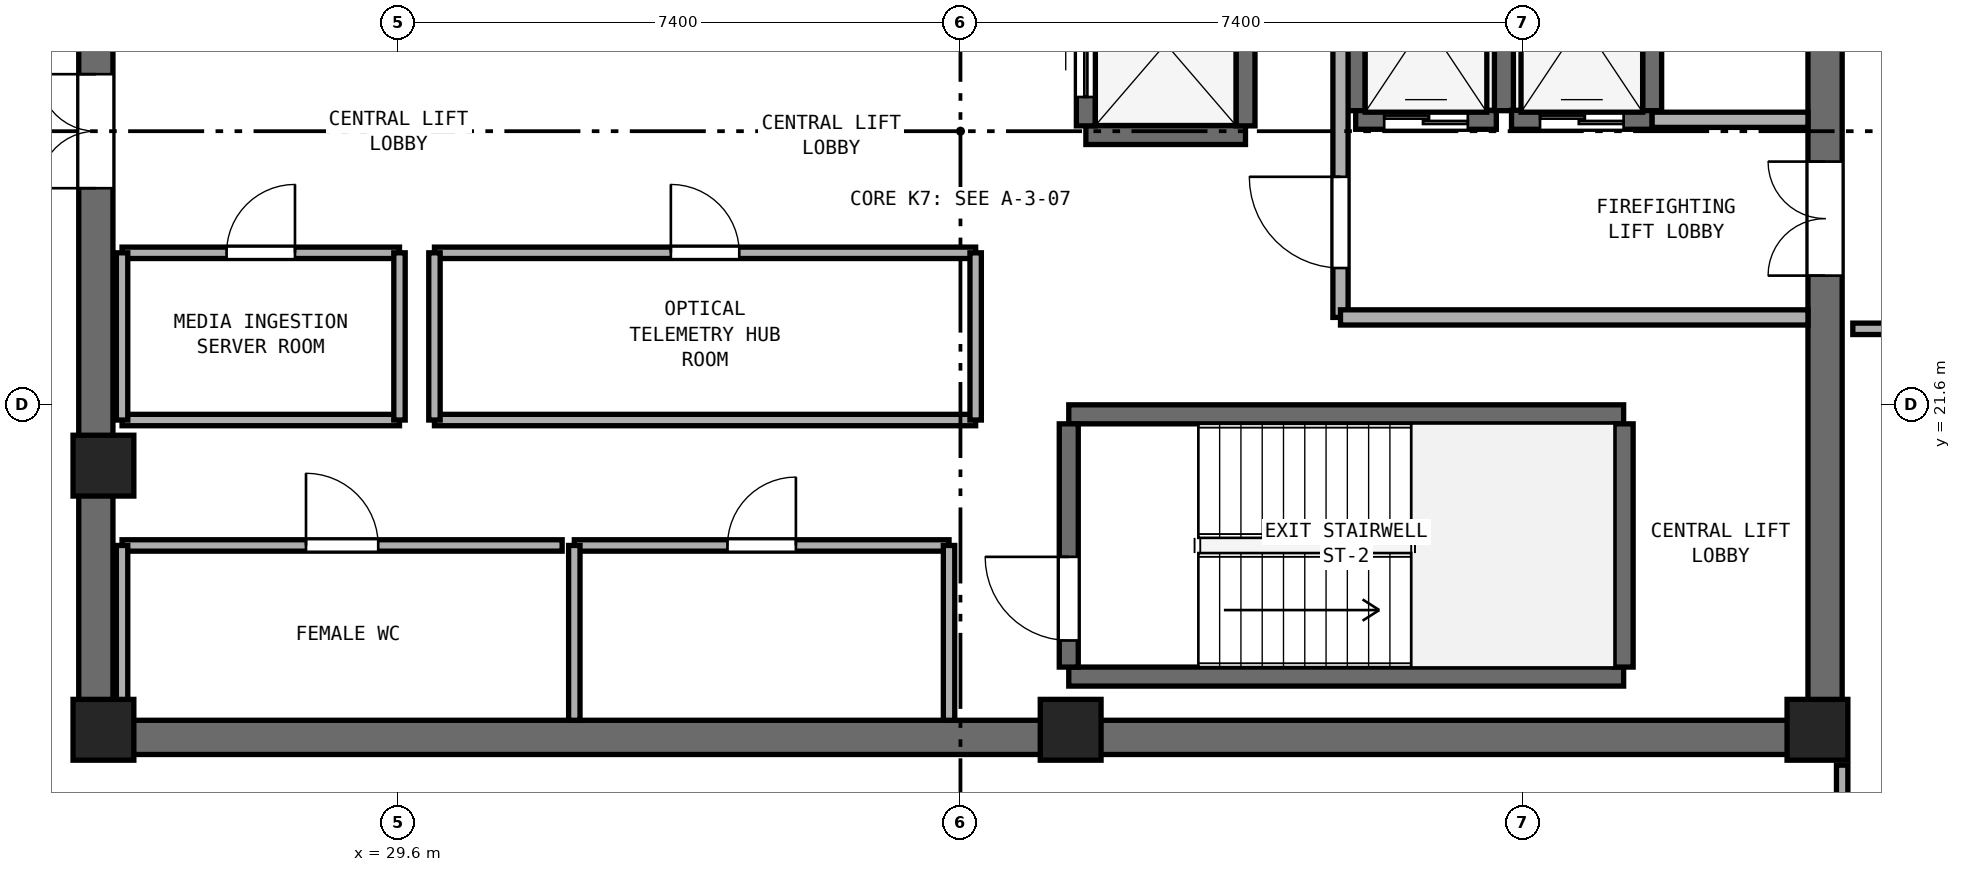
"""IFC4 building model, lengths in metres.
Left out: names, types, materials, properties, quantities, classifications, styles, units other than length and angle.
Written with IfcOpenShell. Run it as: python <this file> out.ifc"""

import sys

from ifc_helpers import new_model, si_unit, direction, frame, frame_2d, origin, origin_2d, place, context, subcontext, project, spatial, rectangle, extrude, element, fill, save


model = new_model("IFC4")
c1 = context("Model", 3, precision=1e-05, world=origin(), true_north=direction((0.0, 1.0)))
c2 = subcontext(c1, "Body", "Model", "MODEL_VIEW")
j1 = project(units=[si_unit("LENGTHUNIT", "METRE"), si_unit("PLANEANGLEUNIT", "RADIAN")], contexts=[c1])
p1 = place(None, origin())
s1 = spatial("IfcSite", under=j1, at=p1, CompositionType="ELEMENT")
p2 = place(p1, origin())
s2 = spatial("IfcBuilding", under=s1, at=p2, CompositionType="ELEMENT")
p3 = place(p2, frame((0.0, 0.0, 297.2)))
s3 = spatial("IfcBuildingStorey", under=s2, at=p3, CompositionType="ELEMENT", Elevation=297.2)
p4 = place(p3, frame((25.4, 17.225, 0.0), z_axis=(0.0, 0.0, 1.0), x_axis=(1.0, 0.0, 0.0)))
e1 = element("IfcWall", 1, at=p4, inside=s3, PredefinedType="SHEAR", context=c2, shape_type="SweptSolid", body=[
    extrude(rectangle(XDim=23.2, YDim=0.45, at=frame_2d((11.6, 0.0))), origin(), (0.0, 0.0, 1.0), 3.54),
])
p5 = place(p3, frame((25.625, 17.45, 0.0), z_axis=(0.0, 0.0, 1.0), x_axis=(0.0, 1.0, 0.0)))
e2 = element("IfcWall", 2, at=p5, inside=s3, PredefinedType="SHEAR", context=c2, shape_type="SweptSolid", body=[
    extrude(rectangle(XDim=15.5, YDim=0.45, at=frame_2d((7.75, 0.0))), origin(), (0.0, 0.0, 1.0), 3.54),
])
p6 = place(p5, frame((7.0, 0.0, 0.0)))
e3 = element("IfcOpeningElement", 3, at=p6, cuts=e2, PredefinedType="OPENING", context=c2, shape_type="SweptSolid", body=[
    extrude(rectangle(XDim=1.5, YDim=2.15, at=frame_2d((0.75, 1.075))), frame((0.0, 0.235, 0.0), z_axis=(0.0, -1.0, 0.0), x_axis=(1.0, 0.0, 0.0)), (0.0, 0.0, 1.0), 0.47),
])
p7 = place(p3, frame((48.375, 17.45, 0.0), z_axis=(0.0, 0.0, 1.0), x_axis=(0.0, 1.0, 0.0)))
e4 = element("IfcWall", 4, at=p7, inside=s3, PredefinedType="SHEAR", context=c2, shape_type="SweptSolid", body=[
    extrude(rectangle(XDim=15.5, YDim=0.45, at=frame_2d((7.75, 0.0))), origin(), (0.0, 0.0, 1.0), 3.54),
])
p8 = place(p7, frame((5.85, 0.0, 0.0)))
e5 = element("IfcOpeningElement", 5, at=p8, cuts=e4, PredefinedType="OPENING", context=c2, shape_type="SweptSolid", body=[
    extrude(rectangle(XDim=1.5, YDim=2.15, at=frame_2d((0.75, 1.075))), frame((0.0, 0.235, 0.0), z_axis=(0.0, -1.0, 0.0), x_axis=(1.0, 0.0, 0.0)), (0.0, 0.0, 1.0), 0.47),
])
for number, where, z_axis, x_axis in (
    (6, (25.725, 17.325, 0.0), (0.0, 0.0, 1.0), (1.0, 0.0, 0.0)),
    (7, (38.45, 17.325, 0.0), (0.0, 0.0, 1.0), (1.0, 0.0, 0.0)),
    (8, (48.275, 17.325, 0.0), (0.0, 0.0, 1.0), (1.0, 0.0, 0.0)),
    (9, (25.725, 20.8, 0.0), (0.0, 0.0, 1.0), (1.0, 0.0, 0.0)),
):
    element("IfcColumn", number, at=place(p3, frame(where, z_axis=z_axis, x_axis=x_axis)), inside=s3, PredefinedType="PILASTER", context=c2, shape_type="SweptSolid", body=[
        extrude(rectangle(XDim=0.8, YDim=0.8, at=origin_2d()), origin(), (0.0, 0.0, 1.0), 3.8),
    ])
for number, where, z_axis, x_axis in (
    (10, (38.425, 18.025, 0.0), (0.0, 0.0, 1.0), (1.0, 0.0, 0.0)),
    (11, (38.425, 21.475, 0.0), (0.0, 0.0, 1.0), (1.0, 0.0, 0.0)),
):
    element("IfcWall", number, at=place(p3, frame(where, z_axis=z_axis, x_axis=x_axis)), inside=s3, PredefinedType="SHEAR", context=c2, shape_type="SweptSolid", body=[
        extrude(rectangle(XDim=7.3, YDim=0.25, at=frame_2d((3.65, 0.0))), origin(), (0.0, 0.0, 1.0), 3.54),
    ])
p9 = place(p3, frame((38.425, 18.15, 0.0), z_axis=(0.0, 0.0, 1.0), x_axis=(0.0, 1.0, 0.0)))
e12 = element("IfcWall", 12, at=p9, inside=s3, PredefinedType="SHEAR", context=c2, shape_type="SweptSolid", body=[
    extrude(rectangle(XDim=3.2, YDim=0.25, at=frame_2d((1.6, 0.0))), origin(), (0.0, 0.0, 1.0), 3.54),
])
p10 = place(p9, frame((0.35, 0.0, 0.0)))
e13 = element("IfcOpeningElement", 13, at=p10, cuts=e12, PredefinedType="OPENING", context=c2, shape_type="SweptSolid", body=[
    extrude(rectangle(XDim=1.1, YDim=2.15, at=frame_2d((0.55, 1.075))), frame((0.0, 0.135, 0.0), z_axis=(0.0, -1.0, 0.0), x_axis=(1.0, 0.0, 0.0)), (0.0, 0.0, 1.0), 0.27),
])
p11 = place(p3, frame((45.725, 18.15, 0.0), z_axis=(0.0, 0.0, 1.0), x_axis=(0.0, 1.0, 0.0)))
e14 = element("IfcWall", 14, at=p11, inside=s3, PredefinedType="SHEAR", context=c2, shape_type="SweptSolid", body=[
    extrude(rectangle(XDim=3.2, YDim=0.25, at=frame_2d((1.6, 0.0))), origin(), (0.0, 0.0, 1.0), 3.54),
])
p12 = place(p3, frame((42.2, 25.35, 0.0), z_axis=(0.0, 0.0, 1.0), x_axis=(1.0, 0.0, 0.0)))
e15 = element("IfcWall", 15, at=p12, inside=s3, PredefinedType="SHEAR", context=c2, shape_type="SweptSolid", body=[
    extrude(rectangle(XDim=1.85, YDim=0.25, at=frame_2d((0.925, 0.0))), origin(), (0.0, 0.0, 1.0), 3.54),
])
p13 = place(p12, frame((0.375, 0.0, 0.0)))
e16 = element("IfcOpeningElement", 16, at=p13, cuts=e15, PredefinedType="OPENING", context=c2, shape_type="SweptSolid", body=[
    extrude(rectangle(XDim=1.1, YDim=2.15, at=frame_2d((0.55, 1.075))), frame((0.0, 0.135, 0.0), z_axis=(0.0, -1.0, 0.0), x_axis=(1.0, 0.0, 0.0)), (0.0, 0.0, 1.0), 0.27),
])
for number, where, z_axis, x_axis in (
    (17, (42.2, 25.47, 0.0), (0.0, 0.0, 1.0), (0.0, 1.0, 0.0)),
    (18, (44.15, 25.47, 0.0), (0.0, 0.0, 1.0), (0.0, 1.0, 0.0)),
):
    element("IfcWall", number, at=place(p3, frame(where, z_axis=z_axis, x_axis=x_axis)), inside=s3, PredefinedType="SHEAR", context=c2, shape_type="SweptSolid", body=[
        extrude(rectangle(XDim=2.36, YDim=0.25, at=frame_2d((1.18, 0.0))), origin(), (0.0, 0.0, 1.0), 3.54),
    ])
p14 = place(p3, frame((44.25, 25.35, 0.0), z_axis=(0.0, 0.0, 1.0), x_axis=(1.0, 0.0, 0.0)))
e19 = element("IfcWall", 19, at=p14, inside=s3, PredefinedType="SHEAR", context=c2, shape_type="SweptSolid", body=[
    extrude(rectangle(XDim=1.85, YDim=0.25, at=frame_2d((0.925, 0.0))), origin(), (0.0, 0.0, 1.0), 3.54),
])
p15 = place(p14, frame((0.375, 0.0, 0.0)))
e20 = element("IfcOpeningElement", 20, at=p15, cuts=e19, PredefinedType="OPENING", context=c2, shape_type="SweptSolid", body=[
    extrude(rectangle(XDim=1.1, YDim=2.15, at=frame_2d((0.55, 1.075))), frame((0.0, 0.135, 0.0), z_axis=(0.0, -1.0, 0.0), x_axis=(1.0, 0.0, 0.0)), (0.0, 0.0, 1.0), 0.27),
])
p16 = place(p3, frame((46.1, 25.47, 0.0), z_axis=(0.0, 0.0, 1.0), x_axis=(0.0, 1.0, 0.0)))
e21 = element("IfcWall", 21, at=p16, inside=s3, PredefinedType="SHEAR", context=c2, shape_type="SweptSolid", body=[
    extrude(rectangle(XDim=2.36, YDim=0.25, at=frame_2d((1.18, 0.0))), origin(), (0.0, 0.0, 1.0), 3.54),
])
p17 = place(p3, frame((38.65, 25.15, 0.0), z_axis=(0.0, 0.0, 1.0), x_axis=(1.0, 0.0, 0.0)))
e22 = element("IfcWall", 22, at=p17, inside=s3, PredefinedType="SHEAR", context=c2, shape_type="SweptSolid", body=[
    extrude(rectangle(XDim=2.1, YDim=0.25, at=frame_2d((1.05, 0.0))), origin(), (0.0, 0.0, 1.0), 3.54),
])
p18 = place(p3, frame((38.65, 25.27, 0.0), z_axis=(0.0, 0.0, 1.0), x_axis=(0.0, 1.0, 0.0)))
e23 = element("IfcWall", 23, at=p18, inside=s3, PredefinedType="SHEAR", context=c2, shape_type="SweptSolid", body=[
    extrude(rectangle(XDim=2.16, YDim=0.25, at=frame_2d((1.08, 0.0))), origin(), (0.0, 0.0, 1.0), 3.54),
])
p19 = place(p18, frame((0.38, 0.0, 0.0)))
e24 = element("IfcOpeningElement", 24, at=p19, cuts=e23, PredefinedType="OPENING", context=c2, shape_type="SweptSolid", body=[
    extrude(rectangle(XDim=1.4, YDim=2.2, at=frame_2d((0.7, 1.1))), frame((0.0, 0.135, 0.0), z_axis=(0.0, -1.0, 0.0), x_axis=(1.0, 0.0, 0.0)), (0.0, 0.0, 1.0), 0.27),
])
p20 = place(p3, frame((40.75, 25.27, 0.0), z_axis=(0.0, 0.0, 1.0), x_axis=(0.0, 1.0, 0.0)))
e25 = element("IfcWall", 25, at=p20, inside=s3, PredefinedType="SHEAR", context=c2, shape_type="SweptSolid", body=[
    extrude(rectangle(XDim=2.16, YDim=0.25, at=frame_2d((1.08, 0.0))), origin(), (0.0, 0.0, 1.0), 3.54),
])
p21 = place(p3, frame((42.0, 22.75, 0.0), z_axis=(0.0, 0.0, 1.0), x_axis=(0.0, 1.0, 0.0)))
e26 = element("IfcWall", 26, at=p21, inside=s3, PredefinedType="SOLIDWALL", context=c2, shape_type="SweptSolid", body=[
    extrude(rectangle(XDim=6.05, YDim=0.2, at=frame_2d((3.025, 0.0))), origin(), (0.0, 0.0, 1.0), 3.54),
])
p22 = place(p21, frame((0.65, 0.0, 0.0)))
e27 = element("IfcOpeningElement", 27, at=p22, cuts=e26, PredefinedType="OPENING", context=c2, shape_type="SweptSolid", body=[
    extrude(rectangle(XDim=1.2, YDim=2.15, at=frame_2d((0.6, 1.075))), frame((0.0, 0.11, 0.0), z_axis=(0.0, -1.0, 0.0), x_axis=(1.0, 0.0, 0.0)), (0.0, 0.0, 1.0), 0.22),
])
p23 = place(p3, frame((42.0, 22.75, 0.0), z_axis=(0.0, 0.0, 1.0), x_axis=(1.0, 0.0, 0.0)))
e28 = element("IfcWall", 28, at=p23, inside=s3, PredefinedType="SOLIDWALL", context=c2, shape_type="SweptSolid", body=[
    extrude(rectangle(XDim=6.15, YDim=0.2, at=frame_2d((3.075, 0.0))), origin(), (0.0, 0.0, 1.0), 3.54),
])
p24 = place(p3, frame((46.1, 25.35, 0.0), z_axis=(0.0, 0.0, 1.0), x_axis=(1.0, 0.0, 0.0)))
e29 = element("IfcWall", 29, at=p24, inside=s3, PredefinedType="SOLIDWALL", context=c2, shape_type="SweptSolid", body=[
    extrude(rectangle(XDim=2.05, YDim=0.2, at=frame_2d((1.025, 0.0))), origin(), (0.0, 0.0, 1.0), 3.54),
])
p25 = place(p3, frame((25.97, 19.75, 0.0), z_axis=(0.0, 0.0, 1.0), x_axis=(1.0, 0.0, 0.0)))
e30 = element("IfcWall", 30, at=p25, inside=s3, PredefinedType="PARTITIONING", context=c2, shape_type="SweptSolid", body=[
    extrude(rectangle(XDim=5.79, YDim=0.15, at=frame_2d((2.895, 0.0))), origin(), (0.0, 0.0, 1.0), 3.54),
])
p26 = place(p25, frame((2.42, 0.0, 0.0)))
e31 = element("IfcOpeningElement", 31, at=p26, cuts=e30, PredefinedType="OPENING", context=c2, shape_type="SweptSolid", body=[
    extrude(rectangle(XDim=0.95, YDim=2.1, at=frame_2d((0.475, 1.05))), frame((0.0, 0.085, 0.0), z_axis=(0.0, -1.0, 0.0), x_axis=(1.0, 0.0, 0.0)), (0.0, 0.0, 1.0), 0.17),
])
p27 = place(p3, frame((25.97, 17.45, 0.0), z_axis=(0.0, 0.0, 1.0), x_axis=(0.0, 1.0, 0.0)))
e32 = element("IfcWall", 32, at=p27, inside=s3, PredefinedType="PARTITIONING", context=c2, shape_type="SweptSolid", body=[
    extrude(rectangle(XDim=2.3, YDim=0.15, at=frame_2d((1.15, 0.0))), origin(), (0.0, 0.0, 1.0), 2.64),
])
p28 = place(p3, frame((31.92, 19.75, 0.0), z_axis=(0.0, 0.0, 1.0), x_axis=(1.0, 0.0, 0.0)))
e33 = element("IfcWall", 33, at=p28, inside=s3, PredefinedType="PARTITIONING", context=c2, shape_type="SweptSolid", body=[
    extrude(rectangle(XDim=4.93, YDim=0.15, at=frame_2d((2.465, 0.0))), origin(), (0.0, 0.0, 1.0), 3.54),
])
p29 = place(p28, frame((2.015, 0.0, 0.0)))
e34 = element("IfcOpeningElement", 34, at=p29, cuts=e33, PredefinedType="OPENING", context=c2, shape_type="SweptSolid", body=[
    extrude(rectangle(XDim=0.9, YDim=2.1, at=frame_2d((0.45, 1.05))), frame((0.0, 0.085, 0.0), z_axis=(0.0, -1.0, 0.0), x_axis=(1.0, 0.0, 0.0)), (0.0, 0.0, 1.0), 0.17),
])
for number, where, z_axis, x_axis in (
    (35, (31.92, 17.45, 0.0), (0.0, 0.0, 1.0), (0.0, 1.0, 0.0)),
    (36, (36.85, 17.45, 0.0), (0.0, 0.0, 1.0), (0.0, 1.0, 0.0)),
):
    element("IfcWall", number, at=place(p3, frame(where, z_axis=z_axis, x_axis=x_axis)), inside=s3, PredefinedType="PARTITIONING", context=c2, shape_type="SweptSolid", body=[
        extrude(rectangle(XDim=2.3, YDim=0.15, at=frame_2d((1.15, 0.0))), origin(), (0.0, 0.0, 1.0), 3.54),
    ])
p30 = place(p3, frame((25.97, 21.4, 0.0), z_axis=(0.0, 0.0, 1.0), x_axis=(1.0, 0.0, 0.0)))
e37 = element("IfcWall", 37, at=p30, inside=s3, PredefinedType="PARTITIONING", context=c2, shape_type="SweptSolid", body=[
    extrude(rectangle(XDim=3.65, YDim=0.15, at=frame_2d((1.825, 0.0))), origin(), (0.0, 0.0, 1.0), 3.54),
])
p31 = place(p3, frame((25.97, 23.6, 0.0), z_axis=(0.0, 0.0, 1.0), x_axis=(1.0, 0.0, 0.0)))
e38 = element("IfcWall", 38, at=p31, inside=s3, PredefinedType="PARTITIONING", context=c2, shape_type="SweptSolid", body=[
    extrude(rectangle(XDim=3.65, YDim=0.15, at=frame_2d((1.825, 0.0))), origin(), (0.0, 0.0, 1.0), 3.54),
])
p32 = place(p31, frame((1.375, 0.0, 0.0)))
e39 = element("IfcOpeningElement", 39, at=p32, cuts=e38, PredefinedType="OPENING", context=c2, shape_type="SweptSolid", body=[
    extrude(rectangle(XDim=0.9, YDim=2.1, at=frame_2d((0.45, 1.05))), frame((0.0, 0.085, 0.0), z_axis=(0.0, -1.0, 0.0), x_axis=(1.0, 0.0, 0.0)), (0.0, 0.0, 1.0), 0.17),
])
p33 = place(p3, frame((25.97, 21.4, 0.0), z_axis=(0.0, 0.0, 1.0), x_axis=(0.0, 1.0, 0.0)))
e40 = element("IfcWall", 40, at=p33, inside=s3, PredefinedType="PARTITIONING", context=c2, shape_type="SweptSolid", body=[
    extrude(rectangle(XDim=2.2, YDim=0.15, at=frame_2d((1.1, 0.0))), origin(), (0.0, 0.0, 1.0), 2.64),
])
p34 = place(p3, frame((29.62, 21.4, 0.0), z_axis=(0.0, 0.0, 1.0), x_axis=(0.0, 1.0, 0.0)))
e41 = element("IfcWall", 41, at=p34, inside=s3, PredefinedType="PARTITIONING", context=c2, shape_type="SweptSolid", body=[
    extrude(rectangle(XDim=2.2, YDim=0.15, at=frame_2d((1.1, 0.0))), origin(), (0.0, 0.0, 1.0), 3.54),
])
p35 = place(p3, frame((30.08, 21.4, 0.0), z_axis=(0.0, 0.0, 1.0), x_axis=(1.0, 0.0, 0.0)))
e42 = element("IfcWall", 42, at=p35, inside=s3, PredefinedType="PARTITIONING", context=c2, shape_type="SweptSolid", body=[
    extrude(rectangle(XDim=7.12, YDim=0.15, at=frame_2d((3.56, 0.0))), origin(), (0.0, 0.0, 1.0), 3.54),
])
p36 = place(p3, frame((30.08, 23.6, 0.0), z_axis=(0.0, 0.0, 1.0), x_axis=(1.0, 0.0, 0.0)))
e43 = element("IfcWall", 43, at=p36, inside=s3, PredefinedType="PARTITIONING", context=c2, shape_type="SweptSolid", body=[
    extrude(rectangle(XDim=7.12, YDim=0.15, at=frame_2d((3.56, 0.0))), origin(), (0.0, 0.0, 1.0), 3.54),
])
p37 = place(p36, frame((3.11, 0.0, 0.0)))
e44 = element("IfcOpeningElement", 44, at=p37, cuts=e43, PredefinedType="OPENING", context=c2, shape_type="SweptSolid", body=[
    extrude(rectangle(XDim=0.9, YDim=2.1, at=frame_2d((0.45, 1.05))), frame((0.0, 0.085, 0.0), z_axis=(0.0, -1.0, 0.0), x_axis=(1.0, 0.0, 0.0)), (0.0, 0.0, 1.0), 0.17),
])
for number, where, z_axis, x_axis in (
    (45, (30.08, 21.4, 0.0), (0.0, 0.0, 1.0), (0.0, 1.0, 0.0)),
    (46, (37.2, 21.4, 0.0), (0.0, 0.0, 1.0), (0.0, 1.0, 0.0)),
):
    element("IfcWall", number, at=place(p3, frame(where, z_axis=z_axis, x_axis=x_axis)), inside=s3, PredefinedType="PARTITIONING", context=c2, shape_type="SweptSolid", body=[
        extrude(rectangle(XDim=2.2, YDim=0.15, at=frame_2d((1.1, 0.0))), origin(), (0.0, 0.0, 1.0), 3.54),
    ])
p38 = place(p3, frame((48.6, 13.7, 0.0), z_axis=(0.0, 0.0, 1.0), x_axis=(0.0, 1.0, 0.0)))
e47 = element("IfcWall", 47, at=p38, inside=s3, PredefinedType="PARTITIONING", context=c2, shape_type="SweptSolid", body=[
    extrude(rectangle(XDim=3.16, YDim=0.15, at=frame_2d((1.58, 0.0))), origin(), (0.0, 0.0, 1.0), 3.54),
])
p39 = place(p3, frame((48.74, 22.6, 0.0), z_axis=(0.0, 0.0, 1.0), x_axis=(1.0, 0.0, 0.0)))
e48 = element("IfcWall", 48, at=p39, inside=s3, PredefinedType="PARTITIONING", context=c2, shape_type="SweptSolid", body=[
    extrude(rectangle(XDim=3.16, YDim=0.15, at=frame_2d((1.58, 0.0))), origin(), (0.0, 0.0, 1.0), 3.54),
])
p40 = place(p10, origin())
e49 = element("IfcDoor", 49, at=p40, inside=s3, OperationType="SINGLE_SWING_RIGHT", PredefinedType="DOOR", context=c2, shape_type="SweptSolid", body=[
    extrude(rectangle(XDim=1.1, YDim=2.15, at=frame_2d((0.55, 1.075))), frame((0.0, 0.025, 0.0), z_axis=(0.0, -1.0, 0.0), x_axis=(1.0, 0.0, 0.0)), (0.0, 0.0, 1.0), 0.05),
])
fill(e13, e49)
p41 = place(p13, origin())
e50 = element("IfcDoor", 50, at=p41, inside=s3, OperationType="DOUBLE_DOOR_SLIDING", PredefinedType="DOOR", context=c2, shape_type="SweptSolid", body=[
    extrude(rectangle(XDim=1.1, YDim=2.15, at=frame_2d((0.55, 1.075))), frame((0.0, 0.025, 0.0), z_axis=(0.0, -1.0, 0.0), x_axis=(1.0, 0.0, 0.0)), (0.0, 0.0, 1.0), 0.05),
])
fill(e16, e50)
p42 = place(p15, origin())
e51 = element("IfcDoor", 51, at=p42, inside=s3, OperationType="DOUBLE_DOOR_SLIDING", PredefinedType="DOOR", context=c2, shape_type="SweptSolid", body=[
    extrude(rectangle(XDim=1.1, YDim=2.15, at=frame_2d((0.55, 1.075))), frame((0.0, 0.025, 0.0), z_axis=(0.0, -1.0, 0.0), x_axis=(1.0, 0.0, 0.0)), (0.0, 0.0, 1.0), 0.05),
])
fill(e20, e51)
p43 = place(p19, origin())
e52 = element("IfcDoor", 52, at=p43, inside=s3, OperationType="DOUBLE_DOOR_SLIDING", PredefinedType="DOOR", context=c2, shape_type="SweptSolid", body=[
    extrude(rectangle(XDim=1.4, YDim=2.2, at=frame_2d((0.7, 1.1))), frame((0.0, 0.025, 0.0), z_axis=(0.0, -1.0, 0.0), x_axis=(1.0, 0.0, 0.0)), (0.0, 0.0, 1.0), 0.05),
])
fill(e24, e52)
p44 = place(p22, origin())
e53 = element("IfcDoor", 53, at=p44, inside=s3, OperationType="SINGLE_SWING_RIGHT", PredefinedType="DOOR", context=c2, shape_type="SweptSolid", body=[
    extrude(rectangle(XDim=1.2, YDim=2.15, at=frame_2d((0.6, 1.075))), frame((0.0, 0.025, 0.0), z_axis=(0.0, -1.0, 0.0), x_axis=(1.0, 0.0, 0.0)), (0.0, 0.0, 1.0), 0.05),
])
fill(e27, e53)
p45 = place(p6, origin())
e54 = element("IfcDoor", 54, at=p45, inside=s3, OperationType="DOUBLE_DOOR_SINGLE_SWING", PredefinedType="DOOR", context=c2, shape_type="SweptSolid", body=[
    extrude(rectangle(XDim=1.5, YDim=2.15, at=frame_2d((0.75, 1.075))), frame((0.0, 0.025, 0.0), z_axis=(0.0, -1.0, 0.0), x_axis=(1.0, 0.0, 0.0)), (0.0, 0.0, 1.0), 0.05),
])
fill(e3, e54)
p46 = place(p8, origin())
e55 = element("IfcDoor", 55, at=p46, inside=s3, OperationType="DOUBLE_DOOR_SINGLE_SWING", PredefinedType="DOOR", context=c2, shape_type="SweptSolid", body=[
    extrude(rectangle(XDim=1.5, YDim=2.15, at=frame_2d((0.75, 1.075))), frame((0.0, 0.025, 0.0), z_axis=(0.0, -1.0, 0.0), x_axis=(1.0, 0.0, 0.0)), (0.0, 0.0, 1.0), 0.05),
])
fill(e5, e55)
p47 = place(p26, origin())
e56 = element("IfcDoor", 56, at=p47, inside=s3, OperationType="SINGLE_SWING_LEFT", PredefinedType="DOOR", context=c2, shape_type="SweptSolid", body=[
    extrude(rectangle(XDim=0.95, YDim=2.1, at=frame_2d((0.475, 1.05))), frame((0.0, 0.025, 0.0), z_axis=(0.0, -1.0, 0.0), x_axis=(1.0, 0.0, 0.0)), (0.0, 0.0, 1.0), 0.05),
])
fill(e31, e56)
p48 = place(p29, origin())
e57 = element("IfcDoor", 57, at=p48, inside=s3, OperationType="SINGLE_SWING_RIGHT", PredefinedType="DOOR", context=c2, shape_type="SweptSolid", body=[
    extrude(rectangle(XDim=0.9, YDim=2.1, at=frame_2d((0.45, 1.05))), frame((0.0, 0.025, 0.0), z_axis=(0.0, -1.0, 0.0), x_axis=(1.0, 0.0, 0.0)), (0.0, 0.0, 1.0), 0.05),
])
fill(e34, e57)
p49 = place(p32, origin())
e58 = element("IfcDoor", 58, at=p49, inside=s3, OperationType="SINGLE_SWING_RIGHT", PredefinedType="DOOR", context=c2, shape_type="SweptSolid", body=[
    extrude(rectangle(XDim=0.9, YDim=2.1, at=frame_2d((0.45, 1.05))), frame((0.0, 0.025, 0.0), z_axis=(0.0, -1.0, 0.0), x_axis=(1.0, 0.0, 0.0)), (0.0, 0.0, 1.0), 0.05),
])
fill(e39, e58)
p50 = place(p37, origin())
e59 = element("IfcDoor", 59, at=p50, inside=s3, OperationType="SINGLE_SWING_LEFT", PredefinedType="DOOR", context=c2, shape_type="SweptSolid", body=[
    extrude(rectangle(XDim=0.9, YDim=2.1, at=frame_2d((0.45, 1.05))), frame((0.0, 0.025, 0.0), z_axis=(0.0, -1.0, 0.0), x_axis=(1.0, 0.0, 0.0)), (0.0, 0.0, 1.0), 0.05),
])
fill(e44, e59)
save(model, sys.argv[1])
